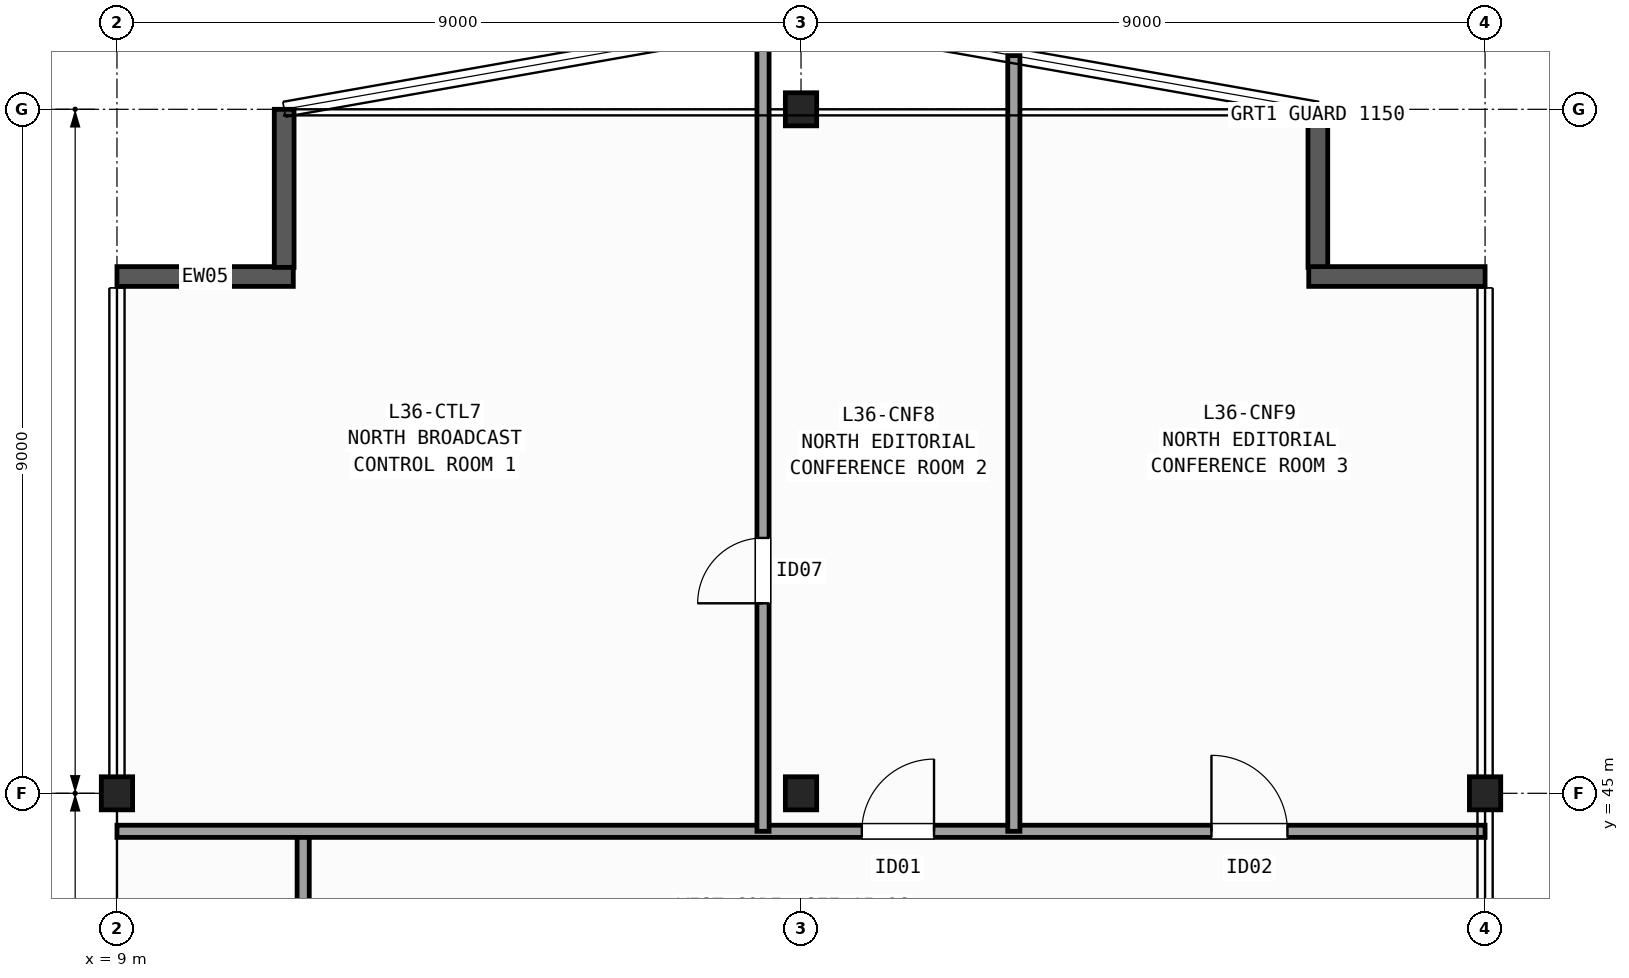
"""IFC4 building model, lengths in metres.
Left out: names, types, materials, properties, quantities, classifications, styles, units other than length and angle.
Written with IfcOpenShell. Run it as: python <this file> out.ifc"""

import sys

from ifc_helpers import new_model, si_unit, direction, frame, frame_2d, origin, origin_2d, place, context, subcontext, project, spatial, rectangle, i_section, extrude, element, fill, save


model = new_model("IFC4")
c1 = context("Model", 3, precision=1e-05, world=origin(), true_north=direction((0.0, 1.0)))
c2 = subcontext(c1, "Body", "Model", "MODEL_VIEW")
j1 = project(units=[si_unit("LENGTHUNIT", "METRE"), si_unit("PLANEANGLEUNIT", "RADIAN")], contexts=[c1])
p1 = place(None, origin())
s1 = spatial("IfcSite", under=j1, at=p1, CompositionType="ELEMENT")
p2 = place(p1, origin())
s2 = spatial("IfcBuilding", under=s1, at=p2, CompositionType="ELEMENT")
p3 = place(p2, frame((0.0, 0.0, 147.0)))
s3 = spatial("IfcBuildingStorey", under=s2, at=p3, CompositionType="ELEMENT", Elevation=147.0)
for number, where, z_axis, x_axis in (
    (1, (9.0, 45.0, 0.0), (0.0, 0.0, 1.0), (1.0, 0.0, 0.0)),
    (2, (18.0, 45.0, 0.0), (0.0, 0.0, 1.0), (1.0, 0.0, 0.0)),
    (3, (18.0, 54.0, 0.0), (0.0, 0.0, 1.0), (1.0, 0.0, 0.0)),
    (4, (27.0, 45.0, 0.0), (0.0, 0.0, 1.0), (1.0, 0.0, 0.0)),
):
    element("IfcColumn", number, at=place(p3, frame(where, z_axis=z_axis, x_axis=x_axis)), inside=s3, PredefinedType="COLUMN", context=c2, shape_type="SweptSolid", body=[
        extrude(i_section(OverallWidth=0.412, OverallDepth=0.435, WebThickness=0.036, FlangeThickness=0.057, FilletRadius=0.015, at=origin_2d()), origin(), (0.0, 0.0, 1.0), 3.7),
    ])
p4 = place(p3, frame((9.0, 51.8, 0.0), z_axis=(0.0, 0.0, 1.0), x_axis=(1.0, 0.0, 0.0)))
e5 = element("IfcWall", 5, at=p4, inside=s3, PredefinedType="SOLIDWALL", context=c2, shape_type="SweptSolid", body=[
    extrude(rectangle(XDim=2.32, YDim=0.26, at=frame_2d((1.16, 0.0))), origin(), (0.0, 0.0, 1.0), 3.42),
])
for number, where, z_axis, x_axis in (
    (6, (11.2, 51.92, 0.0), (0.0, 0.0, 1.0), (0.0, 1.0, 0.0)),
    (7, (24.8, 54.0, 0.0), (0.0, 0.0, 1.0), (0.0, -1.0, 0.0)),
):
    element("IfcWall", number, at=place(p3, frame(where, z_axis=z_axis, x_axis=x_axis)), inside=s3, PredefinedType="SOLIDWALL", context=c2, shape_type="SweptSolid", body=[
        extrude(rectangle(XDim=2.08, YDim=0.26, at=frame_2d((1.04, 0.0))), origin(), (0.0, 0.0, 1.0), 3.42),
    ])
p5 = place(p3, frame((24.68, 51.8, 0.0), z_axis=(0.0, 0.0, 1.0), x_axis=(1.0, 0.0, 0.0)))
e8 = element("IfcWall", 8, at=p5, inside=s3, PredefinedType="SOLIDWALL", context=c2, shape_type="SweptSolid", body=[
    extrude(rectangle(XDim=2.32, YDim=0.26, at=frame_2d((1.16, 0.0))), origin(), (0.0, 0.0, 1.0), 3.42),
])
p6 = place(p3, frame((11.45, 42.4, 0.0), z_axis=(0.0, 0.0, 1.0), x_axis=(0.0, 1.0, 0.0)))
e9 = element("IfcWall", 9, at=p6, inside=s3, PredefinedType="PARTITIONING", context=c2, shape_type="SweptSolid", body=[
    extrude(rectangle(XDim=2.1, YDim=0.16, at=frame_2d((1.05, 0.0))), origin(), (0.0, 0.0, 1.0), 3.42),
])
p7 = place(p3, frame((9.0, 44.5, 0.0), z_axis=(0.0, 0.0, 1.0), x_axis=(1.0, 0.0, 0.0)))
e10 = element("IfcWall", 10, at=p7, inside=s3, PredefinedType="PARTITIONING", context=c2, shape_type="SweptSolid", body=[
    extrude(rectangle(XDim=18.0, YDim=0.16, at=frame_2d((9.0, 0.0))), origin(), (0.0, 0.0, 1.0), 2.634),
])
p8 = place(p7, frame((9.8, 0.0, 0.0)))
e11 = element("IfcOpeningElement", 11, at=p8, cuts=e10, PredefinedType="OPENING", context=c2, shape_type="SweptSolid", body=[
    extrude(rectangle(XDim=0.95, YDim=2.1, at=frame_2d((0.475, 1.05))), frame((0.0, 0.09, 0.0), z_axis=(0.0, -1.0, 0.0), x_axis=(1.0, 0.0, 0.0)), (0.0, 0.0, 1.0), 0.18),
])
p9 = place(p7, frame((14.4, 0.0, 0.0)))
e12 = element("IfcOpeningElement", 12, at=p9, cuts=e10, PredefinedType="OPENING", context=c2, shape_type="SweptSolid", body=[
    extrude(rectangle(XDim=1.0, YDim=2.1, at=frame_2d((0.5, 1.05))), frame((0.0, 0.09, 0.0), z_axis=(0.0, -1.0, 0.0), x_axis=(1.0, 0.0, 0.0)), (0.0, 0.0, 1.0), 0.18),
])
p10 = place(p3, frame((17.5, 44.5, 0.0), z_axis=(0.0, 0.0, 1.0), x_axis=(0.0, 1.0, 0.0)))
e13 = element("IfcWall", 13, at=p10, inside=s3, PredefinedType="PARTITIONING", context=c2, shape_type="SweptSolid", body=[
    extrude(rectangle(XDim=10.612, YDim=0.16, at=frame_2d((5.306, 0.0))), origin(), (0.0, 0.0, 1.0), 3.42),
])
p11 = place(p10, frame((3.0, 0.0, 0.0)))
e14 = element("IfcOpeningElement", 14, at=p11, cuts=e13, PredefinedType="OPENING", context=c2, shape_type="SweptSolid", body=[
    extrude(rectangle(XDim=0.86, YDim=2.05, at=frame_2d((0.43, 1.025))), frame((0.0, 0.09, 0.0), z_axis=(0.0, -1.0, 0.0), x_axis=(1.0, 0.0, 0.0)), (0.0, 0.0, 1.0), 0.18),
])
p12 = place(p3, frame((20.8, 44.5, 0.0), z_axis=(0.0, 0.0, 1.0), x_axis=(0.0, 1.0, 0.0)))
e15 = element("IfcWall", 15, at=p12, inside=s3, PredefinedType="PARTITIONING", context=c2, shape_type="SweptSolid", body=[
    extrude(rectangle(XDim=10.206, YDim=0.16, at=frame_2d((5.103, 0.0))), origin(), (0.0, 0.0, 1.0), 3.42),
])
p13 = place(p11, origin())
e16 = element("IfcDoor", 16, at=p13, inside=s3, OperationType="SINGLE_SWING_LEFT", PredefinedType="DOOR", context=c2, shape_type="SweptSolid", body=[
    extrude(rectangle(XDim=0.86, YDim=2.05, at=frame_2d((0.43, 1.025))), frame((0.0, 0.025, 0.0), z_axis=(0.0, -1.0, 0.0), x_axis=(1.0, 0.0, 0.0)), (0.0, 0.0, 1.0), 0.05),
])
fill(e14, e16)
p14 = place(p8, origin())
e17 = element("IfcDoor", 17, at=p14, inside=s3, OperationType="SINGLE_SWING_RIGHT", PredefinedType="DOOR", context=c2, shape_type="SweptSolid", body=[
    extrude(rectangle(XDim=0.95, YDim=2.1, at=frame_2d((0.475, 1.05))), frame((0.0, 0.025, 0.0), z_axis=(0.0, -1.0, 0.0), x_axis=(1.0, 0.0, 0.0)), (0.0, 0.0, 1.0), 0.05),
])
fill(e11, e17)
p15 = place(p9, origin())
e18 = element("IfcDoor", 18, at=p15, inside=s3, OperationType="SINGLE_SWING_LEFT", PredefinedType="DOOR", context=c2, shape_type="SweptSolid", body=[
    extrude(rectangle(XDim=1.0, YDim=2.1, at=frame_2d((0.5, 1.05))), frame((0.0, 0.025, 0.0), z_axis=(0.0, -1.0, 0.0), x_axis=(1.0, 0.0, 0.0)), (0.0, 0.0, 1.0), 0.05),
])
fill(e12, e18)
save(model, sys.argv[1])
